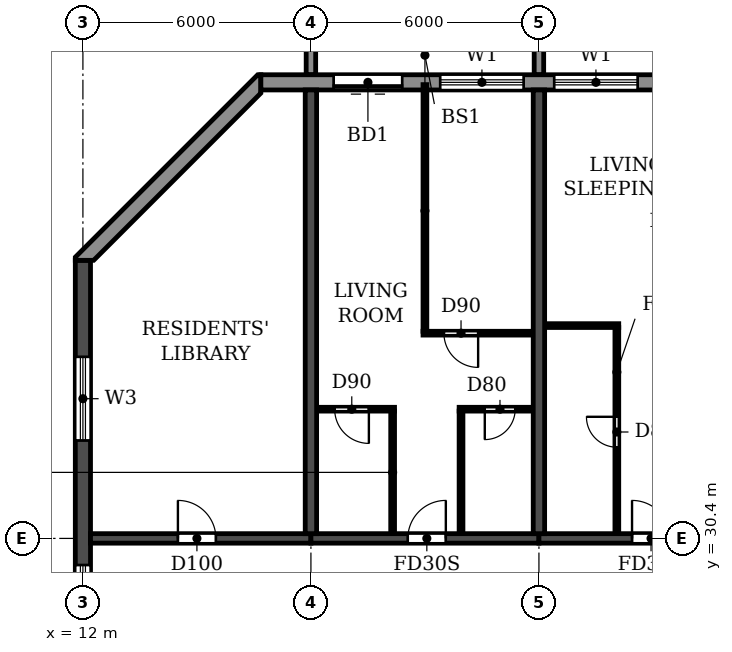
"""IFC4 building model, lengths in metres.
Left out: names, types, materials, properties, quantities, classifications, styles, units other than length and angle.
Written with IfcOpenShell. Run it as: python <this file> out.ifc"""

import sys

from ifc_helpers import new_model, si_unit, direction, frame, frame_2d, origin, place, context, subcontext, project, spatial, polyline, rectangle, outline, extrude, source, transform, mapped, element, fill, save


model = new_model("IFC4")
c1 = context("Model", 3, precision=1e-05, world=origin(), true_north=direction((0.0, 1.0)))
c2 = subcontext(c1, "Body", "Model", "MODEL_VIEW")
j1 = project(units=[si_unit("LENGTHUNIT", "METRE"), si_unit("PLANEANGLEUNIT", "RADIAN")], contexts=[c1])
p1 = place(None, origin())
s1 = spatial("IfcSite", under=j1, at=p1, CompositionType="ELEMENT")
p2 = place(p1, origin())
s2 = spatial("IfcBuilding", under=s1, at=p2, CompositionType="ELEMENT")
p3 = place(p2, frame((0.0, 0.0, 152.1)))
s3 = spatial("IfcBuildingStorey", under=s2, at=p3, CompositionType="ELEMENT", Elevation=152.1)
for number, where, z_axis, x_axis in (
    (1, (18.0, 30.525, 0.0), (0.0, 0.0, 1.0), (0.0, 1.0, 0.0)),
    (2, (24.0, 30.525, 0.0), (0.0, 0.0, 1.0), (0.0, 1.0, 0.0)),
):
    element("IfcWall", number, at=place(p3, frame(where, z_axis=z_axis, x_axis=x_axis)), inside=s3, PredefinedType="SHEAR", context=c2, shape_type="SweptSolid", body=[
        extrude(rectangle(XDim=11.675, YDim=0.3, at=frame_2d((5.837, 0.0))), origin(), (0.0, 0.0, 1.0), 3.07),
    ])
p4 = place(p3, frame((12.0, 4.683, 0.0), z_axis=(0.0, 0.0, 1.0), x_axis=(0.0, 1.0, 0.0)))
e3 = element("IfcWall", 3, at=p4, inside=s3, PredefinedType="SHEAR", context=c2, shape_type="SweptSolid", body=[
    extrude(rectangle(XDim=33.034, YDim=0.4, at=frame_2d((16.517, 0.0))), origin(), (0.0, 0.0, 1.0), 3.07),
])
p5 = place(p4, frame((23.817, 0.0, 0.9)))
e4 = element("IfcOpeningElement", 4, at=p5, cuts=e3, PredefinedType="OPENING", context=c2, shape_type="SweptSolid", body=[
    extrude(rectangle(XDim=1.2, YDim=1.5, at=frame_2d((0.6, 0.75))), frame((0.0, 0.21, 0.0), z_axis=(0.0, -1.0, 0.0), x_axis=(1.0, 0.0, 0.0)), (0.0, 0.0, 1.0), 0.42),
])
p6 = place(p4, frame((8.017, 0.0, 0.9)))
e5 = element("IfcOpeningElement", 5, at=p6, cuts=e3, PredefinedType="OPENING", context=c2, shape_type="SweptSolid", body=[
    extrude(rectangle(XDim=1.2, YDim=1.5, at=frame_2d((0.6, 0.75))), frame((0.0, 0.21, 0.0), z_axis=(0.0, -1.0, 0.0), x_axis=(1.0, 0.0, 0.0)), (0.0, 0.0, 1.0), 0.42),
])
p7 = place(p4, frame((28.293, 0.0, 0.6)))
e6 = element("IfcOpeningElement", 6, at=p7, cuts=e3, PredefinedType="OPENING", context=c2, shape_type="SweptSolid", body=[
    extrude(rectangle(XDim=2.2, YDim=1.8, at=frame_2d((1.1, 0.9))), frame((0.0, 0.21, 0.0), z_axis=(0.0, -1.0, 0.0), x_axis=(1.0, 0.0, 0.0)), (0.0, 0.0, 1.0), 0.42),
])
p8 = place(p4, frame((2.541, 0.0, 0.6)))
e7 = element("IfcOpeningElement", 7, at=p8, cuts=e3, PredefinedType="OPENING", context=c2, shape_type="SweptSolid", body=[
    extrude(rectangle(XDim=2.2, YDim=1.8, at=frame_2d((1.1, 0.9))), frame((0.0, 0.21, 0.0), z_axis=(0.0, -1.0, 0.0), x_axis=(1.0, 0.0, 0.0)), (0.0, 0.0, 1.0), 0.42),
])
p9 = place(p3, frame((12.2, 30.4, 0.0), z_axis=(0.0, 0.0, 1.0), x_axis=(1.0, 0.0, 0.0)))
e8 = element("IfcWall", 8, at=p9, inside=s3, PredefinedType="SHEAR", context=c2, shape_type="SweptSolid", body=[
    extrude(rectangle(XDim=5.8, YDim=0.25, at=frame_2d((2.9, 0.0))), origin(), (0.0, 0.0, 1.0), 2.47),
])
p10 = place(p9, frame((2.3, 0.0, 0.0)))
e9 = element("IfcOpeningElement", 9, at=p10, cuts=e8, PredefinedType="OPENING", context=c2, shape_type="SweptSolid", body=[
    extrude(rectangle(XDim=1.0, YDim=2.1, at=frame_2d((0.5, 1.05))), frame((0.0, 0.135, 0.0), z_axis=(0.0, -1.0, 0.0), x_axis=(1.0, 0.0, 0.0)), (0.0, 0.0, 1.0), 0.27),
])
p11 = place(p3, frame((18.0, 30.4, 0.0), z_axis=(0.0, 0.0, 1.0), x_axis=(1.0, 0.0, 0.0)))
e10 = element("IfcWall", 10, at=p11, inside=s3, PredefinedType="SHEAR", context=c2, shape_type="SweptSolid", body=[
    extrude(rectangle(XDim=6.0, YDim=0.25, at=frame_2d((3.0, 0.0))), origin(), (0.0, 0.0, 1.0), 2.47),
])
p12 = place(p11, frame((2.55, 0.0, 0.0)))
e11 = element("IfcOpeningElement", 11, at=p12, cuts=e10, PredefinedType="OPENING", context=c2, shape_type="SweptSolid", body=[
    extrude(rectangle(XDim=1.0, YDim=2.1, at=frame_2d((0.5, 1.05))), frame((0.0, 0.135, 0.0), z_axis=(0.0, -1.0, 0.0), x_axis=(1.0, 0.0, 0.0)), (0.0, 0.0, 1.0), 0.27),
])
p13 = place(p3, frame((24.0, 30.4, 0.0), z_axis=(0.0, 0.0, 1.0), x_axis=(1.0, 0.0, 0.0)))
e12 = element("IfcWall", 12, at=p13, inside=s3, PredefinedType="SHEAR", context=c2, shape_type="SweptSolid", body=[
    extrude(rectangle(XDim=6.0, YDim=0.25, at=frame_2d((3.0, 0.0))), origin(), (0.0, 0.0, 1.0), 2.47),
])
p14 = place(p13, frame((2.45, 0.0, 0.0)))
e13 = element("IfcOpeningElement", 13, at=p14, cuts=e12, PredefinedType="OPENING", context=c2, shape_type="SweptSolid", body=[
    extrude(rectangle(XDim=1.0, YDim=2.1, at=frame_2d((0.5, 1.05))), frame((0.0, 0.135, 0.0), z_axis=(0.0, -1.0, 0.0), x_axis=(1.0, 0.0, 0.0)), (0.0, 0.0, 1.0), 0.27),
])
p15 = place(p3, frame((85.317, 42.4, 0.0), z_axis=(0.0, 0.0, 1.0), x_axis=(-1.0, 0.0, 0.0)))
e14 = element("IfcWall", 14, at=p15, inside=s3, PredefinedType="STANDARD", context=c2, shape_type="SweptSolid", body=[
    extrude(rectangle(XDim=68.634, YDim=0.4, at=frame_2d((34.317, 0.0))), origin(), (0.0, 0.0, 1.0), 3.07),
])
p16 = place(p15, frame((64.917, 0.0, 0.0)))
e15 = element("IfcOpeningElement", 15, at=p16, cuts=e14, PredefinedType="OPENING", context=c2, shape_type="SweptSolid", body=[
    extrude(rectangle(XDim=1.8, YDim=2.4, at=frame_2d((0.9, 1.2))), frame((0.0, 0.21, 0.0), z_axis=(0.0, -1.0, 0.0), x_axis=(1.0, 0.0, 0.0)), (0.0, 0.0, 1.0), 0.42),
])
p17 = place(p15, frame((61.717, 0.0, 0.9)))
e16 = element("IfcOpeningElement", 16, at=p17, cuts=e14, PredefinedType="OPENING", context=c2, shape_type="SweptSolid", body=[
    extrude(rectangle(XDim=2.2, YDim=1.5, at=frame_2d((1.1, 0.75))), frame((0.0, 0.21, 0.0), z_axis=(0.0, -1.0, 0.0), x_axis=(1.0, 0.0, 0.0)), (0.0, 0.0, 1.0), 0.42),
])
p18 = place(p15, frame((58.717, 0.0, 0.9)))
e17 = element("IfcOpeningElement", 17, at=p18, cuts=e14, PredefinedType="OPENING", context=c2, shape_type="SweptSolid", body=[
    extrude(rectangle(XDim=2.2, YDim=1.5, at=frame_2d((1.1, 0.75))), frame((0.0, 0.21, 0.0), z_axis=(0.0, -1.0, 0.0), x_axis=(1.0, 0.0, 0.0)), (0.0, 0.0, 1.0), 0.42),
])
p19 = place(p15, frame((55.917, 0.0, 0.0)))
e18 = element("IfcOpeningElement", 18, at=p19, cuts=e14, PredefinedType="OPENING", context=c2, shape_type="SweptSolid", body=[
    extrude(rectangle(XDim=1.8, YDim=2.4, at=frame_2d((0.9, 1.2))), frame((0.0, 0.21, 0.0), z_axis=(0.0, -1.0, 0.0), x_axis=(1.0, 0.0, 0.0)), (0.0, 0.0, 1.0), 0.42),
])
p20 = place(p15, frame((52.917, 0.0, 0.0)))
e19 = element("IfcOpeningElement", 19, at=p20, cuts=e14, PredefinedType="OPENING", context=c2, shape_type="SweptSolid", body=[
    extrude(rectangle(XDim=1.8, YDim=2.4, at=frame_2d((0.9, 1.2))), frame((0.0, 0.21, 0.0), z_axis=(0.0, -1.0, 0.0), x_axis=(1.0, 0.0, 0.0)), (0.0, 0.0, 1.0), 0.42),
])
p21 = place(p15, frame((49.717, 0.0, 0.9)))
e20 = element("IfcOpeningElement", 20, at=p21, cuts=e14, PredefinedType="OPENING", context=c2, shape_type="SweptSolid", body=[
    extrude(rectangle(XDim=2.2, YDim=1.5, at=frame_2d((1.1, 0.75))), frame((0.0, 0.21, 0.0), z_axis=(0.0, -1.0, 0.0), x_axis=(1.0, 0.0, 0.0)), (0.0, 0.0, 1.0), 0.42),
])
p22 = place(p15, frame((46.717, 0.0, 0.9)))
e21 = element("IfcOpeningElement", 21, at=p22, cuts=e14, PredefinedType="OPENING", context=c2, shape_type="SweptSolid", body=[
    extrude(rectangle(XDim=2.2, YDim=1.5, at=frame_2d((1.1, 0.75))), frame((0.0, 0.21, 0.0), z_axis=(0.0, -1.0, 0.0), x_axis=(1.0, 0.0, 0.0)), (0.0, 0.0, 1.0), 0.42),
])
p23 = place(p15, frame((43.717, 0.0, 0.9)))
e22 = element("IfcOpeningElement", 22, at=p23, cuts=e14, PredefinedType="OPENING", context=c2, shape_type="SweptSolid", body=[
    extrude(rectangle(XDim=2.2, YDim=1.5, at=frame_2d((1.1, 0.75))), frame((0.0, 0.21, 0.0), z_axis=(0.0, -1.0, 0.0), x_axis=(1.0, 0.0, 0.0)), (0.0, 0.0, 1.0), 0.42),
])
p24 = place(p15, frame((40.917, 0.0, 0.0)))
e23 = element("IfcOpeningElement", 23, at=p24, cuts=e14, PredefinedType="OPENING", context=c2, shape_type="SweptSolid", body=[
    extrude(rectangle(XDim=1.8, YDim=2.4, at=frame_2d((0.9, 1.2))), frame((0.0, 0.21, 0.0), z_axis=(0.0, -1.0, 0.0), x_axis=(1.0, 0.0, 0.0)), (0.0, 0.0, 1.0), 0.42),
])
p25 = place(p15, frame((37.717, 0.0, 0.9)))
e24 = element("IfcOpeningElement", 24, at=p25, cuts=e14, PredefinedType="OPENING", context=c2, shape_type="SweptSolid", body=[
    extrude(rectangle(XDim=2.2, YDim=1.5, at=frame_2d((1.1, 0.75))), frame((0.0, 0.21, 0.0), z_axis=(0.0, -1.0, 0.0), x_axis=(1.0, 0.0, 0.0)), (0.0, 0.0, 1.0), 0.42),
])
p26 = place(p15, frame((34.917, 0.0, 0.0)))
e25 = element("IfcOpeningElement", 25, at=p26, cuts=e14, PredefinedType="OPENING", context=c2, shape_type="SweptSolid", body=[
    extrude(rectangle(XDim=1.8, YDim=2.4, at=frame_2d((0.9, 1.2))), frame((0.0, 0.21, 0.0), z_axis=(0.0, -1.0, 0.0), x_axis=(1.0, 0.0, 0.0)), (0.0, 0.0, 1.0), 0.42),
])
p27 = place(p15, frame((31.717, 0.0, 0.9)))
e26 = element("IfcOpeningElement", 26, at=p27, cuts=e14, PredefinedType="OPENING", context=c2, shape_type="SweptSolid", body=[
    extrude(rectangle(XDim=2.2, YDim=1.5, at=frame_2d((1.1, 0.75))), frame((0.0, 0.21, 0.0), z_axis=(0.0, -1.0, 0.0), x_axis=(1.0, 0.0, 0.0)), (0.0, 0.0, 1.0), 0.42),
])
p28 = place(p15, frame((28.717, 0.0, 0.9)))
e27 = element("IfcOpeningElement", 27, at=p28, cuts=e14, PredefinedType="OPENING", context=c2, shape_type="SweptSolid", body=[
    extrude(rectangle(XDim=2.2, YDim=1.5, at=frame_2d((1.1, 0.75))), frame((0.0, 0.21, 0.0), z_axis=(0.0, -1.0, 0.0), x_axis=(1.0, 0.0, 0.0)), (0.0, 0.0, 1.0), 0.42),
])
p29 = place(p15, frame((25.717, 0.0, 0.9)))
e28 = element("IfcOpeningElement", 28, at=p29, cuts=e14, PredefinedType="OPENING", context=c2, shape_type="SweptSolid", body=[
    extrude(rectangle(XDim=2.2, YDim=1.5, at=frame_2d((1.1, 0.75))), frame((0.0, 0.21, 0.0), z_axis=(0.0, -1.0, 0.0), x_axis=(1.0, 0.0, 0.0)), (0.0, 0.0, 1.0), 0.42),
])
p30 = place(p15, frame((22.717, 0.0, 0.9)))
e29 = element("IfcOpeningElement", 29, at=p30, cuts=e14, PredefinedType="OPENING", context=c2, shape_type="SweptSolid", body=[
    extrude(rectangle(XDim=2.2, YDim=1.5, at=frame_2d((1.1, 0.75))), frame((0.0, 0.21, 0.0), z_axis=(0.0, -1.0, 0.0), x_axis=(1.0, 0.0, 0.0)), (0.0, 0.0, 1.0), 0.42),
])
p31 = place(p15, frame((19.917, 0.0, 0.0)))
e30 = element("IfcOpeningElement", 30, at=p31, cuts=e14, PredefinedType="OPENING", context=c2, shape_type="SweptSolid", body=[
    extrude(rectangle(XDim=1.8, YDim=2.4, at=frame_2d((0.9, 1.2))), frame((0.0, 0.21, 0.0), z_axis=(0.0, -1.0, 0.0), x_axis=(1.0, 0.0, 0.0)), (0.0, 0.0, 1.0), 0.42),
])
p32 = place(p15, frame((16.717, 0.0, 0.9)))
e31 = element("IfcOpeningElement", 31, at=p32, cuts=e14, PredefinedType="OPENING", context=c2, shape_type="SweptSolid", body=[
    extrude(rectangle(XDim=2.2, YDim=1.5, at=frame_2d((1.1, 0.75))), frame((0.0, 0.21, 0.0), z_axis=(0.0, -1.0, 0.0), x_axis=(1.0, 0.0, 0.0)), (0.0, 0.0, 1.0), 0.42),
])
p33 = place(p15, frame((13.717, 0.0, 0.9)))
e32 = element("IfcOpeningElement", 32, at=p33, cuts=e14, PredefinedType="OPENING", context=c2, shape_type="SweptSolid", body=[
    extrude(rectangle(XDim=2.2, YDim=1.5, at=frame_2d((1.1, 0.75))), frame((0.0, 0.21, 0.0), z_axis=(0.0, -1.0, 0.0), x_axis=(1.0, 0.0, 0.0)), (0.0, 0.0, 1.0), 0.42),
])
p34 = place(p15, frame((10.917, 0.0, 0.0)))
e33 = element("IfcOpeningElement", 33, at=p34, cuts=e14, PredefinedType="OPENING", context=c2, shape_type="SweptSolid", body=[
    extrude(rectangle(XDim=1.8, YDim=2.4, at=frame_2d((0.9, 1.2))), frame((0.0, 0.21, 0.0), z_axis=(0.0, -1.0, 0.0), x_axis=(1.0, 0.0, 0.0)), (0.0, 0.0, 1.0), 0.42),
])
p35 = place(p15, frame((7.717, 0.0, 0.9)))
e34 = element("IfcOpeningElement", 34, at=p35, cuts=e14, PredefinedType="OPENING", context=c2, shape_type="SweptSolid", body=[
    extrude(rectangle(XDim=2.2, YDim=1.5, at=frame_2d((1.1, 0.75))), frame((0.0, 0.21, 0.0), z_axis=(0.0, -1.0, 0.0), x_axis=(1.0, 0.0, 0.0)), (0.0, 0.0, 1.0), 0.42),
])
p36 = place(p15, frame((4.717, 0.0, 0.9)))
e35 = element("IfcOpeningElement", 35, at=p36, cuts=e14, PredefinedType="OPENING", context=c2, shape_type="SweptSolid", body=[
    extrude(rectangle(XDim=2.2, YDim=1.5, at=frame_2d((1.1, 0.75))), frame((0.0, 0.21, 0.0), z_axis=(0.0, -1.0, 0.0), x_axis=(1.0, 0.0, 0.0)), (0.0, 0.0, 1.0), 0.42),
])
p37 = place(p15, frame((1.917, 0.0, 0.0)))
e36 = element("IfcOpeningElement", 36, at=p37, cuts=e14, PredefinedType="OPENING", context=c2, shape_type="SweptSolid", body=[
    extrude(rectangle(XDim=1.8, YDim=2.4, at=frame_2d((0.9, 1.2))), frame((0.0, 0.21, 0.0), z_axis=(0.0, -1.0, 0.0), x_axis=(1.0, 0.0, 0.0)), (0.0, 0.0, 1.0), 0.42),
])
p38 = place(p3, origin())
e37 = element("IfcWall", 37, at=p38, inside=s3, PredefinedType="STANDARD", context=c2, shape_type="SweptSolid", body=[
    extrude(outline(polyline([(16.683, 42.6), (16.6, 42.6), (11.8, 37.8), (11.8, 37.717), (12.283, 37.717), (16.683, 42.117), (16.683, 42.6)])), origin(), (0.0, 0.0, 1.0), 3.07),
])
m1 = source(origin(), c2, "Body", "SweptSolid", [
    extrude(outline(polyline([(0.0, 0.0), (0.25, 0.0), (0.25, 3.1), (0.0, 3.1), (0.0, 0.0)])), origin(), (0.0, 0.0, 1.0), 3.1),
])
for number, where in (
    (38, (17.875, 42.6, 0.0)),
    (39, (23.875, 42.6, 0.0)),
):
    element("IfcWall", number, at=place(p3, frame(where)), inside=s3, PredefinedType="STANDARD", context=c2, shape_type="MappedRepresentation", body=[
        mapped(m1, transform((0.0, 0.0, 0.0))),
    ])
p39 = place(p3, frame((18.16, 33.8, 0.0), z_axis=(0.0, 0.0, 1.0), x_axis=(1.0, 0.0, 0.0)))
e40 = element("IfcWall", 40, at=p39, inside=s3, PredefinedType="PARTITIONING", context=c2, shape_type="SweptSolid", body=[
    extrude(rectangle(XDim=2.04, YDim=0.1, at=frame_2d((1.02, 0.0))), origin(), (0.0, 0.0, 1.0), 3.07),
])
p40 = place(p39, frame((0.465, 0.0, 0.0)))
e41 = element("IfcOpeningElement", 41, at=p40, cuts=e40, PredefinedType="OPENING", context=c2, shape_type="SweptSolid", body=[
    extrude(rectangle(XDim=0.9, YDim=2.1, at=frame_2d((0.45, 1.05))), frame((0.0, 0.06, 0.0), z_axis=(0.0, -1.0, 0.0), x_axis=(1.0, 0.0, 0.0)), (0.0, 0.0, 1.0), 0.12),
])
p41 = place(p3, frame((21.9, 33.8, 0.0), z_axis=(0.0, 0.0, 1.0), x_axis=(1.0, 0.0, 0.0)))
e42 = element("IfcWall", 42, at=p41, inside=s3, PredefinedType="PARTITIONING", context=c2, shape_type="SweptSolid", body=[
    extrude(rectangle(XDim=1.94, YDim=0.1, at=frame_2d((0.97, 0.0))), origin(), (0.0, 0.0, 1.0), 3.07),
])
p42 = place(p41, frame((0.675, 0.0, 0.0)))
e43 = element("IfcOpeningElement", 43, at=p42, cuts=e42, PredefinedType="OPENING", context=c2, shape_type="SweptSolid", body=[
    extrude(rectangle(XDim=0.8, YDim=2.1, at=frame_2d((0.4, 1.05))), frame((0.0, 0.06, 0.0), z_axis=(0.0, -1.0, 0.0), x_axis=(1.0, 0.0, 0.0)), (0.0, 0.0, 1.0), 0.12),
])
p43 = place(p3, frame((20.95, 35.8, 0.0), z_axis=(0.0, 0.0, 1.0), x_axis=(1.0, 0.0, 0.0)))
e44 = element("IfcWall", 44, at=p43, inside=s3, PredefinedType="PARTITIONING", context=c2, shape_type="SweptSolid", body=[
    extrude(rectangle(XDim=2.89, YDim=0.1, at=frame_2d((1.445, 0.0))), origin(), (0.0, 0.0, 1.0), 3.07),
])
p44 = place(p43, frame((0.55, 0.0, 0.0)))
e45 = element("IfcOpeningElement", 45, at=p44, cuts=e44, PredefinedType="OPENING", context=c2, shape_type="SweptSolid", body=[
    extrude(rectangle(XDim=0.9, YDim=2.1, at=frame_2d((0.45, 1.05))), frame((0.0, 0.06, 0.0), z_axis=(0.0, -1.0, 0.0), x_axis=(1.0, 0.0, 0.0)), (0.0, 0.0, 1.0), 0.12),
])
p45 = place(p3, frame((24.16, 36.0, 0.0), z_axis=(0.0, 0.0, 1.0), x_axis=(1.0, 0.0, 0.0)))
e46 = element("IfcWall", 46, at=p45, inside=s3, PredefinedType="PARTITIONING", context=c2, shape_type="SweptSolid", body=[
    extrude(rectangle(XDim=1.94, YDim=0.1, at=frame_2d((0.97, 0.0))), origin(), (0.0, 0.0, 1.0), 3.07),
])
p46 = place(p3, frame((20.15, 30.535, 0.0), z_axis=(0.0, 0.0, 1.0), x_axis=(0.0, 1.0, 0.0)))
e47 = element("IfcWall", 47, at=p46, inside=s3, PredefinedType="PARTITIONING", context=c2, shape_type="SweptSolid", body=[
    extrude(rectangle(XDim=3.215, YDim=0.1, at=frame_2d((1.607, 0.0))), origin(), (0.0, 0.0, 1.0), 3.07),
])
p47 = place(p3, frame((21.0, 35.85, 0.0), z_axis=(0.0, 0.0, 1.0), x_axis=(0.0, 1.0, 0.0)))
e48 = element("IfcWall", 48, at=p47, inside=s3, PredefinedType="PARTITIONING", context=c2, shape_type="SweptSolid", body=[
    extrude(rectangle(XDim=6.49, YDim=0.1, at=frame_2d((3.245, 0.0))), origin(), (0.0, 0.0, 1.0), 3.07),
])
p48 = place(p3, frame((21.95, 30.535, 0.0), z_axis=(0.0, 0.0, 1.0), x_axis=(0.0, 1.0, 0.0)))
e49 = element("IfcWall", 49, at=p48, inside=s3, PredefinedType="PARTITIONING", context=c2, shape_type="SweptSolid", body=[
    extrude(rectangle(XDim=3.215, YDim=0.1, at=frame_2d((1.607, 0.0))), origin(), (0.0, 0.0, 1.0), 3.07),
])
p49 = place(p3, frame((26.05, 30.535, 0.0), z_axis=(0.0, 0.0, 1.0), x_axis=(0.0, 1.0, 0.0)))
e50 = element("IfcWall", 50, at=p49, inside=s3, PredefinedType="PARTITIONING", context=c2, shape_type="SweptSolid", body=[
    extrude(rectangle(XDim=5.415, YDim=0.1, at=frame_2d((2.708, 0.0))), origin(), (0.0, 0.0, 1.0), 3.07),
])
p50 = place(p49, frame((2.265, 0.0, 0.0)))
e51 = element("IfcOpeningElement", 51, at=p50, cuts=e50, PredefinedType="OPENING", context=c2, shape_type="SweptSolid", body=[
    extrude(rectangle(XDim=0.8, YDim=2.1, at=frame_2d((0.4, 1.05))), frame((0.0, 0.06, 0.0), z_axis=(0.0, -1.0, 0.0), x_axis=(1.0, 0.0, 0.0)), (0.0, 0.0, 1.0), 0.12),
])
p51 = place(p16, origin())
e52 = element("IfcDoor", 52, at=p51, inside=s3, OperationType="DOUBLE_DOOR_SLIDING", PredefinedType="DOOR", context=c2, shape_type="SweptSolid", body=[
    extrude(rectangle(XDim=1.8, YDim=2.4, at=frame_2d((0.9, 1.2))), frame((0.0, 0.025, 0.0), z_axis=(0.0, -1.0, 0.0), x_axis=(1.0, 0.0, 0.0)), (0.0, 0.0, 1.0), 0.05),
])
fill(e15, e52)
p52 = place(p17, origin())
e53 = element("IfcWindow", 53, at=p52, inside=s3, PartitioningType="DOUBLE_PANEL_HORIZONTAL", PredefinedType="WINDOW", context=c2, shape_type="SweptSolid", body=[
    extrude(rectangle(XDim=2.2, YDim=1.5, at=frame_2d((1.1, 0.75))), frame((0.0, 0.03, 0.0), z_axis=(0.0, -1.0, 0.0), x_axis=(1.0, 0.0, 0.0)), (0.0, 0.0, 1.0), 0.06),
])
fill(e16, e53)
p53 = place(p18, origin())
e54 = element("IfcWindow", 54, at=p53, inside=s3, PartitioningType="DOUBLE_PANEL_HORIZONTAL", PredefinedType="WINDOW", context=c2, shape_type="SweptSolid", body=[
    extrude(rectangle(XDim=2.2, YDim=1.5, at=frame_2d((1.1, 0.75))), frame((0.0, 0.03, 0.0), z_axis=(0.0, -1.0, 0.0), x_axis=(1.0, 0.0, 0.0)), (0.0, 0.0, 1.0), 0.06),
])
fill(e17, e54)
p54 = place(p5, origin())
e55 = element("IfcWindow", 55, at=p54, inside=s3, PartitioningType="SINGLE_PANEL", PredefinedType="WINDOW", context=c2, shape_type="SweptSolid", body=[
    extrude(rectangle(XDim=1.2, YDim=1.5, at=frame_2d((0.6, 0.75))), frame((0.0, 0.03, 0.0), z_axis=(0.0, -1.0, 0.0), x_axis=(1.0, 0.0, 0.0)), (0.0, 0.0, 1.0), 0.06),
])
fill(e4, e55)
p55 = place(p7, origin())
e56 = element("IfcWindow", 56, at=p55, inside=s3, PartitioningType="DOUBLE_PANEL_HORIZONTAL", PredefinedType="WINDOW", context=c2, shape_type="SweptSolid", body=[
    extrude(rectangle(XDim=2.2, YDim=1.8, at=frame_2d((1.1, 0.9))), frame((0.0, 0.03, 0.0), z_axis=(0.0, -1.0, 0.0), x_axis=(1.0, 0.0, 0.0)), (0.0, 0.0, 1.0), 0.06),
])
fill(e6, e56)
p56 = place(p10, origin())
e57 = element("IfcDoor", 57, at=p56, inside=s3, OperationType="SINGLE_SWING_LEFT", PredefinedType="DOOR", context=c2, shape_type="SweptSolid", body=[
    extrude(rectangle(XDim=1.0, YDim=2.1, at=frame_2d((0.5, 1.05))), frame((0.0, 0.025, 0.0), z_axis=(0.0, -1.0, 0.0), x_axis=(1.0, 0.0, 0.0)), (0.0, 0.0, 1.0), 0.05),
])
fill(e9, e57)
p57 = place(p40, frame((0.9, 0.0, 0.0), z_axis=(0.0, 0.0, 1.0), x_axis=(-1.0, 0.0, 0.0)))
e58 = element("IfcDoor", 58, at=p57, inside=s3, OperationType="SINGLE_SWING_LEFT", PredefinedType="DOOR", context=c2, shape_type="SweptSolid", body=[
    extrude(rectangle(XDim=0.9, YDim=2.1, at=frame_2d((0.45, 1.05))), frame((0.0, 0.025, 0.0), z_axis=(0.0, -1.0, 0.0), x_axis=(1.0, 0.0, 0.0)), (0.0, 0.0, 1.0), 0.05),
])
fill(e41, e58)
p58 = place(p12, origin())
e59 = element("IfcDoor", 59, at=p58, inside=s3, OperationType="SINGLE_SWING_RIGHT", PredefinedType="DOOR", context=c2, shape_type="SweptSolid", body=[
    extrude(rectangle(XDim=1.0, YDim=2.1, at=frame_2d((0.5, 1.05))), frame((0.0, 0.025, 0.0), z_axis=(0.0, -1.0, 0.0), x_axis=(1.0, 0.0, 0.0)), (0.0, 0.0, 1.0), 0.05),
])
fill(e11, e59)
p59 = place(p44, frame((0.9, 0.0, 0.0), z_axis=(0.0, 0.0, 1.0), x_axis=(-1.0, 0.0, 0.0)))
e60 = element("IfcDoor", 60, at=p59, inside=s3, OperationType="SINGLE_SWING_LEFT", PredefinedType="DOOR", context=c2, shape_type="SweptSolid", body=[
    extrude(rectangle(XDim=0.9, YDim=2.1, at=frame_2d((0.45, 1.05))), frame((0.0, 0.025, 0.0), z_axis=(0.0, -1.0, 0.0), x_axis=(1.0, 0.0, 0.0)), (0.0, 0.0, 1.0), 0.05),
])
fill(e45, e60)
p60 = place(p42, frame((0.8, 0.0, 0.0), z_axis=(0.0, 0.0, 1.0), x_axis=(-1.0, 0.0, 0.0)))
e61 = element("IfcDoor", 61, at=p60, inside=s3, OperationType="SINGLE_SWING_RIGHT", PredefinedType="DOOR", context=c2, shape_type="SweptSolid", body=[
    extrude(rectangle(XDim=0.8, YDim=2.1, at=frame_2d((0.4, 1.05))), frame((0.0, 0.025, 0.0), z_axis=(0.0, -1.0, 0.0), x_axis=(1.0, 0.0, 0.0)), (0.0, 0.0, 1.0), 0.05),
])
fill(e43, e61)
p61 = place(p50, origin())
e62 = element("IfcDoor", 62, at=p61, inside=s3, OperationType="SINGLE_SWING_RIGHT", PredefinedType="DOOR", context=c2, shape_type="SweptSolid", body=[
    extrude(rectangle(XDim=0.8, YDim=2.1, at=frame_2d((0.4, 1.05))), frame((0.0, 0.025, 0.0), z_axis=(0.0, -1.0, 0.0), x_axis=(1.0, 0.0, 0.0)), (0.0, 0.0, 1.0), 0.05),
])
fill(e51, e62)
p62 = place(p14, origin())
e63 = element("IfcDoor", 63, at=p62, inside=s3, OperationType="SINGLE_SWING_LEFT", PredefinedType="DOOR", context=c2, shape_type="SweptSolid", body=[
    extrude(rectangle(XDim=1.0, YDim=2.1, at=frame_2d((0.5, 1.05))), frame((0.0, 0.025, 0.0), z_axis=(0.0, -1.0, 0.0), x_axis=(1.0, 0.0, 0.0)), (0.0, 0.0, 1.0), 0.05),
])
fill(e13, e63)
save(model, sys.argv[1])
